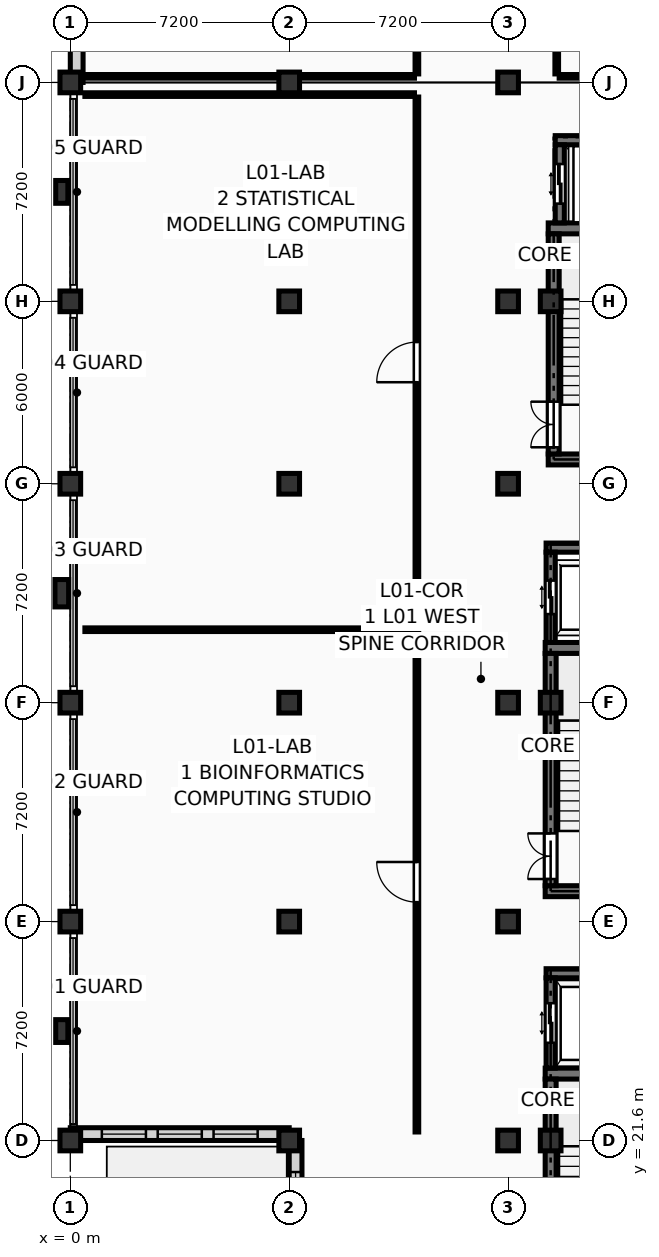
"""IFC4 building model, lengths in metres.
Left out: names, types, materials, properties, quantities, classifications, styles, units other than length and angle.
Written with IfcOpenShell. Run it as: python <this file> out.ifc"""

import sys

from ifc_helpers import new_model, si_unit, direction, frame, frame_2d, origin, origin_2d, place, context, subcontext, project, spatial, rectangle, extrude, element, fill, save


model = new_model("IFC4")
c1 = context("Model", 3, precision=1e-05, world=origin(), true_north=direction((0.0, 1.0)))
c2 = subcontext(c1, "Body", "Model", "MODEL_VIEW")
j1 = project(units=[si_unit("LENGTHUNIT", "METRE"), si_unit("PLANEANGLEUNIT", "RADIAN")], contexts=[c1])
p1 = place(None, origin())
s1 = spatial("IfcSite", under=j1, at=p1, CompositionType="ELEMENT")
p2 = place(p1, origin())
s2 = spatial("IfcBuilding", under=s1, at=p2, CompositionType="ELEMENT")
p3 = place(p2, frame((0.0, 0.0, 4.5)))
s3 = spatial("IfcBuildingStorey", under=s2, at=p3, CompositionType="ELEMENT", Elevation=4.5)
for number, where, z_axis, x_axis in (
    (1, (0.0, 21.6, 0.0), (0.0, 0.0, 1.0), (1.0, 0.0, 0.0)),
    (2, (0.0, 28.8, 0.0), (0.0, 0.0, 1.0), (1.0, 0.0, 0.0)),
    (3, (0.0, 36.0, 0.0), (0.0, 0.0, 1.0), (1.0, 0.0, 0.0)),
    (4, (0.0, 43.2, 0.0), (0.0, 0.0, 1.0), (1.0, 0.0, 0.0)),
    (5, (0.0, 49.2, 0.0), (0.0, 0.0, 1.0), (1.0, 0.0, 0.0)),
    (6, (0.0, 56.4, 0.0), (0.0, 0.0, 1.0), (1.0, 0.0, 0.0)),
    (7, (7.2, 21.6, 0.0), (0.0, 0.0, 1.0), (1.0, 0.0, 0.0)),
    (8, (7.2, 28.8, 0.0), (0.0, 0.0, 1.0), (1.0, 0.0, 0.0)),
    (9, (7.2, 36.0, 0.0), (0.0, 0.0, 1.0), (1.0, 0.0, 0.0)),
    (10, (7.2, 43.2, 0.0), (0.0, 0.0, 1.0), (1.0, 0.0, 0.0)),
    (11, (7.2, 49.2, 0.0), (0.0, 0.0, 1.0), (1.0, 0.0, 0.0)),
    (12, (7.2, 56.4, 0.0), (0.0, 0.0, 1.0), (1.0, 0.0, 0.0)),
    (13, (14.4, 21.6, 0.0), (0.0, 0.0, 1.0), (1.0, 0.0, 0.0)),
    (14, (14.4, 28.8, 0.0), (0.0, 0.0, 1.0), (1.0, 0.0, 0.0)),
    (15, (14.4, 36.0, 0.0), (0.0, 0.0, 1.0), (1.0, 0.0, 0.0)),
    (16, (14.4, 43.2, 0.0), (0.0, 0.0, 1.0), (1.0, 0.0, 0.0)),
    (17, (14.4, 49.2, 0.0), (0.0, 0.0, 1.0), (1.0, 0.0, 0.0)),
    (18, (14.4, 56.4, 0.0), (0.0, 0.0, 1.0), (1.0, 0.0, 0.0)),
    (19, (15.8, 21.6, 0.0), (0.0, 0.0, 1.0), (1.0, 0.0, 0.0)),
    (20, (15.8, 36.0, 0.0), (0.0, 0.0, 1.0), (1.0, 0.0, 0.0)),
    (21, (15.8, 49.2, 0.0), (0.0, 0.0, 1.0), (1.0, 0.0, 0.0)),
):
    element("IfcColumn", number, at=place(p3, frame(where, z_axis=z_axis, x_axis=x_axis)), inside=s3, PredefinedType="COLUMN", context=c2, shape_type="SweptSolid", body=[
        extrude(rectangle(XDim=0.68, YDim=0.68, at=origin_2d()), origin(), (0.0, 0.0, 1.0), 4.05),
    ])
p4 = place(p3, frame((-0.28, 25.2, 0.0), z_axis=(0.0, 0.0, 1.0), x_axis=(1.0, 0.0, 0.0)))
e22 = element("IfcColumn", 22, at=p4, inside=s3, PredefinedType="PILASTER", context=c2, shape_type="SweptSolid", body=[
    extrude(rectangle(XDim=0.4, YDim=0.75, at=origin_2d()), origin(), (0.0, 0.0, 1.0), 4.05),
])
p5 = place(p3, frame((-0.28, 39.6, 0.0), z_axis=(0.0, 0.0, 1.0), x_axis=(1.0, 0.0, 0.0)))
e23 = element("IfcColumn", 23, at=p5, inside=s3, PredefinedType="PILASTER", context=c2, shape_type="SweptSolid", body=[
    extrude(rectangle(XDim=0.45, YDim=0.9, at=origin_2d()), origin(), (0.0, 0.0, 1.0), 4.05),
])
p6 = place(p3, frame((-0.28, 52.8, 0.0), z_axis=(0.0, 0.0, 1.0), x_axis=(1.0, 0.0, 0.0)))
e24 = element("IfcColumn", 24, at=p6, inside=s3, PredefinedType="PILASTER", context=c2, shape_type="SweptSolid", body=[
    extrude(rectangle(XDim=0.4, YDim=0.75, at=origin_2d()), origin(), (0.0, 0.0, 1.0), 4.05),
])
p7 = place(p3, frame((7.41, 14.4, 0.0), z_axis=(0.0, 0.0, 1.0), x_axis=(0.0, 1.0, 0.0)))
e25 = element("IfcWall", 25, at=p7, inside=s3, PredefinedType="SOLIDWALL", context=c2, shape_type="SweptSolid", body=[
    extrude(rectangle(XDim=7.2, YDim=0.42, at=frame_2d((3.6, 0.0))), origin(), (0.0, 0.0, 1.0), 3.16),
])
p8 = place(p7, frame((1.038, 0.0, 0.18)))
e26 = element("IfcOpeningElement", 26, at=p8, cuts=e25, PredefinedType="OPENING", context=c2, shape_type="SweptSolid", body=[
    extrude(rectangle(XDim=1.45, YDim=2.8, at=frame_2d((0.725, 1.4))), frame((0.0, 0.222, 0.0), z_axis=(0.0, -1.0, 0.0), x_axis=(1.0, 0.0, 0.0)), (0.0, 0.0, 1.0), 0.444),
])
p9 = place(p7, frame((2.875, 0.0, 0.18)))
e27 = element("IfcOpeningElement", 27, at=p9, cuts=e25, PredefinedType="OPENING", context=c2, shape_type="SweptSolid", body=[
    extrude(rectangle(XDim=1.45, YDim=2.8, at=frame_2d((0.725, 1.4))), frame((0.0, 0.222, 0.0), z_axis=(0.0, -1.0, 0.0), x_axis=(1.0, 0.0, 0.0)), (0.0, 0.0, 1.0), 0.444),
])
p10 = place(p7, frame((4.712, 0.0, 0.18)))
e28 = element("IfcOpeningElement", 28, at=p10, cuts=e25, PredefinedType="OPENING", context=c2, shape_type="SweptSolid", body=[
    extrude(rectangle(XDim=1.45, YDim=2.8, at=frame_2d((0.725, 1.4))), frame((0.0, 0.222, 0.0), z_axis=(0.0, -1.0, 0.0), x_axis=(1.0, 0.0, 0.0)), (0.0, 0.0, 1.0), 0.444),
])
p11 = place(p3, frame((0.0, 21.81, 0.0), z_axis=(0.0, 0.0, 1.0), x_axis=(1.0, 0.0, 0.0)))
e29 = element("IfcWall", 29, at=p11, inside=s3, PredefinedType="SOLIDWALL", context=c2, shape_type="SweptSolid", body=[
    extrude(rectangle(XDim=7.2, YDim=0.42, at=frame_2d((3.6, 0.0))), origin(), (0.0, 0.0, 1.0), 3.16),
])
p12 = place(p11, frame((1.038, 0.0, 0.18)))
e30 = element("IfcOpeningElement", 30, at=p12, cuts=e29, PredefinedType="OPENING", context=c2, shape_type="SweptSolid", body=[
    extrude(rectangle(XDim=1.45, YDim=2.8, at=frame_2d((0.725, 1.4))), frame((0.0, 0.222, 0.0), z_axis=(0.0, -1.0, 0.0), x_axis=(1.0, 0.0, 0.0)), (0.0, 0.0, 1.0), 0.444),
])
p13 = place(p11, frame((2.875, 0.0, 0.18)))
e31 = element("IfcOpeningElement", 31, at=p13, cuts=e29, PredefinedType="OPENING", context=c2, shape_type="SweptSolid", body=[
    extrude(rectangle(XDim=1.45, YDim=2.8, at=frame_2d((0.725, 1.4))), frame((0.0, 0.222, 0.0), z_axis=(0.0, -1.0, 0.0), x_axis=(1.0, 0.0, 0.0)), (0.0, 0.0, 1.0), 0.444),
])
p14 = place(p11, frame((4.712, 0.0, 0.18)))
e32 = element("IfcOpeningElement", 32, at=p14, cuts=e29, PredefinedType="OPENING", context=c2, shape_type="SweptSolid", body=[
    extrude(rectangle(XDim=1.45, YDim=2.8, at=frame_2d((0.725, 1.4))), frame((0.0, 0.222, 0.0), z_axis=(0.0, -1.0, 0.0), x_axis=(1.0, 0.0, 0.0)), (0.0, 0.0, 1.0), 0.444),
])
p15 = place(p3, frame((0.21, 56.4, 0.0), z_axis=(0.0, 0.0, 1.0), x_axis=(0.0, 1.0, 0.0)))
e33 = element("IfcWall", 33, at=p15, inside=s3, PredefinedType="SOLIDWALL", context=c2, shape_type="SweptSolid", body=[
    extrude(rectangle(XDim=7.2, YDim=0.42, at=frame_2d((3.6, 0.0))), origin(), (0.0, 0.0, 1.0), 3.16),
])
p16 = place(p15, frame((1.783, 0.0, 0.45)))
e34 = element("IfcOpeningElement", 34, at=p16, cuts=e33, PredefinedType="OPENING", context=c2, shape_type="SweptSolid", body=[
    extrude(rectangle(XDim=1.3, YDim=2.35, at=frame_2d((0.65, 1.175))), frame((0.0, 0.222, 0.0), z_axis=(0.0, -1.0, 0.0), x_axis=(1.0, 0.0, 0.0)), (0.0, 0.0, 1.0), 0.444),
])
p17 = place(p15, frame((4.117, 0.0, 0.45)))
e35 = element("IfcOpeningElement", 35, at=p17, cuts=e33, PredefinedType="OPENING", context=c2, shape_type="SweptSolid", body=[
    extrude(rectangle(XDim=1.3, YDim=2.35, at=frame_2d((0.65, 1.175))), frame((0.0, 0.222, 0.0), z_axis=(0.0, -1.0, 0.0), x_axis=(1.0, 0.0, 0.0)), (0.0, 0.0, 1.0), 0.444),
])
p18 = place(p3, frame((15.62, 23.8, 0.0), z_axis=(0.0, 0.0, 1.0), x_axis=(1.0, 0.0, 0.0)))
e36 = element("IfcWall", 36, at=p18, inside=s3, PredefinedType="SHEAR", context=c2, shape_type="SweptSolid", body=[
    extrude(rectangle(XDim=4.88, YDim=0.36, at=frame_2d((2.44, 0.0))), origin(), (0.0, 0.0, 1.0), 3.79),
])
p19 = place(p3, frame((15.8, 15.98, 0.0), z_axis=(0.0, 0.0, 1.0), x_axis=(0.0, 1.0, 0.0)))
e37 = element("IfcWall", 37, at=p19, inside=s3, PredefinedType="SHEAR", context=c2, shape_type="SweptSolid", body=[
    extrude(rectangle(XDim=7.64, YDim=0.36, at=frame_2d((3.82, 0.0))), origin(), (0.0, 0.0, 1.0), 3.79),
])
p20 = place(p19, frame((0.22, 0.0, 0.0)))
e38 = element("IfcOpeningElement", 38, at=p20, cuts=e37, PredefinedType="OPENING", context=c2, shape_type="SweptSolid", body=[
    extrude(rectangle(XDim=1.5, YDim=2.2, at=frame_2d((0.75, 1.1))), frame((0.0, 0.192, 0.0), z_axis=(0.0, -1.0, 0.0), x_axis=(1.0, 0.0, 0.0)), (0.0, 0.0, 1.0), 0.384),
])
for number, where, z_axis, x_axis in (
    (39, (15.62, 29.8, 0.0), (0.0, 0.0, 1.0), (1.0, 0.0, 0.0)),
    (40, (15.62, 37.8, 0.0), (0.0, 0.0, 1.0), (1.0, 0.0, 0.0)),
):
    element("IfcWall", number, at=place(p3, frame(where, z_axis=z_axis, x_axis=x_axis)), inside=s3, PredefinedType="SHEAR", context=c2, shape_type="SweptSolid", body=[
        extrude(rectangle(XDim=4.88, YDim=0.36, at=frame_2d((2.44, 0.0))), origin(), (0.0, 0.0, 1.0), 3.79),
    ])
p21 = place(p3, frame((15.8, 29.98, 0.0), z_axis=(0.0, 0.0, 1.0), x_axis=(0.0, 1.0, 0.0)))
e41 = element("IfcWall", 41, at=p21, inside=s3, PredefinedType="SHEAR", context=c2, shape_type="SweptSolid", body=[
    extrude(rectangle(XDim=7.64, YDim=0.36, at=frame_2d((3.82, 0.0))), origin(), (0.0, 0.0, 1.0), 3.79),
])
p22 = place(p21, frame((0.22, 0.0, 0.0)))
e42 = element("IfcOpeningElement", 42, at=p22, cuts=e41, PredefinedType="OPENING", context=c2, shape_type="SweptSolid", body=[
    extrude(rectangle(XDim=1.5, YDim=2.2, at=frame_2d((0.75, 1.1))), frame((0.0, 0.192, 0.0), z_axis=(0.0, -1.0, 0.0), x_axis=(1.0, 0.0, 0.0)), (0.0, 0.0, 1.0), 0.384),
])
for number, where, z_axis, x_axis in (
    (43, (15.72, 44.0, 0.0), (0.0, 0.0, 1.0), (1.0, 0.0, 0.0)),
    (44, (15.72, 51.6, 0.0), (0.0, 0.0, 1.0), (1.0, 0.0, 0.0)),
):
    element("IfcWall", number, at=place(p3, frame(where, z_axis=z_axis, x_axis=x_axis)), inside=s3, PredefinedType="SHEAR", context=c2, shape_type="SweptSolid", body=[
        extrude(rectangle(XDim=4.48, YDim=0.36, at=frame_2d((2.24, 0.0))), origin(), (0.0, 0.0, 1.0), 3.79),
    ])
p23 = place(p3, frame((15.9, 44.18, 0.0), z_axis=(0.0, 0.0, 1.0), x_axis=(0.0, 1.0, 0.0)))
e45 = element("IfcWall", 45, at=p23, inside=s3, PredefinedType="SHEAR", context=c2, shape_type="SweptSolid", body=[
    extrude(rectangle(XDim=7.24, YDim=0.36, at=frame_2d((3.62, 0.0))), origin(), (0.0, 0.0, 1.0), 3.79),
])
p24 = place(p23, frame((0.22, 0.0, 0.0)))
e46 = element("IfcOpeningElement", 46, at=p24, cuts=e45, PredefinedType="OPENING", context=c2, shape_type="SweptSolid", body=[
    extrude(rectangle(XDim=1.5, YDim=2.2, at=frame_2d((0.75, 1.1))), frame((0.0, 0.192, 0.0), z_axis=(0.0, -1.0, 0.0), x_axis=(1.0, 0.0, 0.0)), (0.0, 0.0, 1.0), 0.384),
])
p25 = place(p3, frame((15.65, 27.1, 0.0), z_axis=(0.0, 0.0, 1.0), x_axis=(1.0, 0.0, 0.0)))
e47 = element("IfcWall", 47, at=p25, inside=s3, PredefinedType="SHEAR", context=c2, shape_type="SweptSolid", body=[
    extrude(rectangle(XDim=2.56, YDim=0.3, at=frame_2d((1.28, 0.0))), origin(), (0.0, 0.0, 1.0), 3.79),
])
p26 = place(p3, frame((15.8, 23.98, 0.0), z_axis=(0.0, 0.0, 1.0), x_axis=(0.0, 1.0, 0.0)))
e48 = element("IfcWall", 48, at=p26, inside=s3, PredefinedType="SHEAR", context=c2, shape_type="SweptSolid", body=[
    extrude(rectangle(XDim=2.97, YDim=0.3, at=frame_2d((1.485, 0.0))), origin(), (0.0, 0.0, 1.0), 3.79),
])
p27 = place(p26, frame((0.835, 0.0, 0.0)))
e49 = element("IfcOpeningElement", 49, at=p27, cuts=e48, PredefinedType="OPENING", context=c2, shape_type="SweptSolid", body=[
    extrude(rectangle(XDim=1.3, YDim=2.25, at=frame_2d((0.65, 1.125))), frame((0.0, 0.162, 0.0), z_axis=(0.0, -1.0, 0.0), x_axis=(1.0, 0.0, 0.0)), (0.0, 0.0, 1.0), 0.324),
])
p28 = place(p3, frame((15.65, 41.1, 0.0), z_axis=(0.0, 0.0, 1.0), x_axis=(1.0, 0.0, 0.0)))
e50 = element("IfcWall", 50, at=p28, inside=s3, PredefinedType="SHEAR", context=c2, shape_type="SweptSolid", body=[
    extrude(rectangle(XDim=2.56, YDim=0.3, at=frame_2d((1.28, 0.0))), origin(), (0.0, 0.0, 1.0), 3.79),
])
p29 = place(p3, frame((15.8, 37.98, 0.0), z_axis=(0.0, 0.0, 1.0), x_axis=(0.0, 1.0, 0.0)))
e51 = element("IfcWall", 51, at=p29, inside=s3, PredefinedType="SHEAR", context=c2, shape_type="SweptSolid", body=[
    extrude(rectangle(XDim=2.97, YDim=0.3, at=frame_2d((1.485, 0.0))), origin(), (0.0, 0.0, 1.0), 3.79),
])
p30 = place(p29, frame((0.935, 0.0, 0.0)))
e52 = element("IfcOpeningElement", 52, at=p30, cuts=e51, PredefinedType="OPENING", context=c2, shape_type="SweptSolid", body=[
    extrude(rectangle(XDim=1.1, YDim=2.2, at=frame_2d((0.55, 1.1))), frame((0.0, 0.162, 0.0), z_axis=(0.0, -1.0, 0.0), x_axis=(1.0, 0.0, 0.0)), (0.0, 0.0, 1.0), 0.324),
])
p31 = place(p3, frame((15.95, 54.5, 0.0), z_axis=(0.0, 0.0, 1.0), x_axis=(1.0, 0.0, 0.0)))
e53 = element("IfcWall", 53, at=p31, inside=s3, PredefinedType="SHEAR", context=c2, shape_type="SweptSolid", body=[
    extrude(rectangle(XDim=3.0, YDim=0.3, at=frame_2d((1.5, 0.0))), origin(), (0.0, 0.0, 1.0), 3.79),
])
p32 = place(p3, frame((16.1, 51.78, 0.0), z_axis=(0.0, 0.0, 1.0), x_axis=(0.0, 1.0, 0.0)))
e54 = element("IfcWall", 54, at=p32, inside=s3, PredefinedType="SHEAR", context=c2, shape_type="SweptSolid", body=[
    extrude(rectangle(XDim=2.57, YDim=0.3, at=frame_2d((1.285, 0.0))), origin(), (0.0, 0.0, 1.0), 3.79),
])
p33 = place(p32, frame((0.635, 0.0, 0.0)))
e55 = element("IfcOpeningElement", 55, at=p33, cuts=e54, PredefinedType="OPENING", context=c2, shape_type="SweptSolid", body=[
    extrude(rectangle(XDim=1.3, YDim=2.25, at=frame_2d((0.65, 1.125))), frame((0.0, 0.162, 0.0), z_axis=(0.0, -1.0, 0.0), x_axis=(1.0, 0.0, 0.0)), (0.0, 0.0, 1.0), 0.324),
])
p34 = place(p3, frame((11.4, 21.88, 0.0), z_axis=(0.0, 0.0, 1.0), x_axis=(0.0, 1.0, 0.0)))
e56 = element("IfcWall", 56, at=p34, inside=s3, PredefinedType="PARTITIONING", context=c2, shape_type="SweptSolid", body=[
    extrude(rectangle(XDim=16.44, YDim=0.12, at=frame_2d((8.22, 0.0))), origin(), (0.0, 0.0, 1.0), 3.775),
])
p35 = place(p34, frame((7.56, 0.0, 0.0)))
e57 = element("IfcOpeningElement", 57, at=p35, cuts=e56, PredefinedType="OPENING", context=c2, shape_type="SweptSolid", body=[
    extrude(rectangle(XDim=1.32, YDim=2.2, at=frame_2d((0.66, 1.1))), frame((0.0, 0.072, 0.0), z_axis=(0.0, -1.0, 0.0), x_axis=(1.0, 0.0, 0.0)), (0.0, 0.0, 1.0), 0.144),
])
p36 = place(p3, frame((0.48, 38.4, 0.0), z_axis=(0.0, 0.0, 1.0), x_axis=(1.0, 0.0, 0.0)))
e58 = element("IfcWall", 58, at=p36, inside=s3, PredefinedType="PARTITIONING", context=c2, shape_type="SweptSolid", body=[
    extrude(rectangle(XDim=10.84, YDim=0.12, at=frame_2d((5.42, 0.0))), origin(), (0.0, 0.0, 1.0), 3.775),
])
p37 = place(p3, frame((11.4, 38.48, 0.0), z_axis=(0.0, 0.0, 1.0), x_axis=(0.0, 1.0, 0.0)))
e59 = element("IfcWall", 59, at=p37, inside=s3, PredefinedType="PARTITIONING", context=c2, shape_type="SweptSolid", body=[
    extrude(rectangle(XDim=17.44, YDim=0.12, at=frame_2d((8.72, 0.0))), origin(), (0.0, 0.0, 1.0), 3.775),
])
p38 = place(p37, frame((8.06, 0.0, 0.0)))
e60 = element("IfcOpeningElement", 60, at=p38, cuts=e59, PredefinedType="OPENING", context=c2, shape_type="SweptSolid", body=[
    extrude(rectangle(XDim=1.32, YDim=2.2, at=frame_2d((0.66, 1.1))), frame((0.0, 0.072, 0.0), z_axis=(0.0, -1.0, 0.0), x_axis=(1.0, 0.0, 0.0)), (0.0, 0.0, 1.0), 0.144),
])
for number, where, z_axis, x_axis in (
    (61, (0.48, 56.0, 0.0), (0.0, 0.0, 1.0), (1.0, 0.0, 0.0)),
    (62, (0.48, 56.6, 0.0), (0.0, 0.0, 1.0), (1.0, 0.0, 0.0)),
):
    element("IfcWall", number, at=place(p3, frame(where, z_axis=z_axis, x_axis=x_axis)), inside=s3, PredefinedType="PARTITIONING", context=c2, shape_type="SweptSolid", body=[
        extrude(rectangle(XDim=10.84, YDim=0.12, at=frame_2d((5.42, 0.0))), origin(), (0.0, 0.0, 1.0), 3.025),
    ])
p39 = place(p3, frame((11.4, 56.68, 0.0), z_axis=(0.0, 0.0, 1.0), x_axis=(0.0, 1.0, 0.0)))
e63 = element("IfcWall", 63, at=p39, inside=s3, PredefinedType="PARTITIONING", context=c2, shape_type="SweptSolid", body=[
    extrude(rectangle(XDim=28.44, YDim=0.12, at=frame_2d((14.22, 0.0))), origin(), (0.0, 0.0, 1.0), 3.775),
])
p40 = place(p39, frame((13.37, 0.0, 0.0)))
e64 = element("IfcOpeningElement", 64, at=p40, cuts=e63, PredefinedType="OPENING", context=c2, shape_type="SweptSolid", body=[
    extrude(rectangle(XDim=1.7, YDim=2.28, at=frame_2d((0.85, 1.14))), frame((0.0, 0.072, 0.0), z_axis=(0.0, -1.0, 0.0), x_axis=(1.0, 0.0, 0.0)), (0.0, 0.0, 1.0), 0.144),
])
p41 = place(p3, frame((16.0, 56.68, 0.0), z_axis=(0.0, 0.0, 1.0), x_axis=(0.0, 1.0, 0.0)))
e65 = element("IfcWall", 65, at=p41, inside=s3, PredefinedType="PARTITIONING", context=c2, shape_type="SweptSolid", body=[
    extrude(rectangle(XDim=15.1, YDim=0.12, at=frame_2d((7.55, 0.0))), origin(), (0.0, 0.0, 1.0), 3.775),
])
p42 = place(p41, frame((8.558, 0.0, 0.0)))
e66 = element("IfcOpeningElement", 66, at=p42, cuts=e65, PredefinedType="OPENING", context=c2, shape_type="SweptSolid", body=[
    extrude(rectangle(XDim=1.32, YDim=2.2, at=frame_2d((0.66, 1.1))), frame((0.0, 0.072, 0.0), z_axis=(0.0, -1.0, 0.0), x_axis=(1.0, 0.0, 0.0)), (0.0, 0.0, 1.0), 0.144),
])
p43 = place(p3, frame((16.08, 56.6, 0.0), z_axis=(0.0, 0.0, 1.0), x_axis=(1.0, 0.0, 0.0)))
e67 = element("IfcWall", 67, at=p43, inside=s3, PredefinedType="PARTITIONING", context=c2, shape_type="SweptSolid", body=[
    extrude(rectangle(XDim=12.24, YDim=0.12, at=frame_2d((6.12, 0.0))), origin(), (0.0, 0.0, 1.0), 3.025),
])
p44 = place(p10, origin())
e68 = element("IfcWindow", 68, at=p44, inside=s3, PartitioningType="SINGLE_PANEL", PredefinedType="WINDOW", context=c2, shape_type="SweptSolid", body=[
    extrude(rectangle(XDim=1.45, YDim=2.8, at=frame_2d((0.725, 1.4))), frame((0.0, 0.03, 0.0), z_axis=(0.0, -1.0, 0.0), x_axis=(1.0, 0.0, 0.0)), (0.0, 0.0, 1.0), 0.06),
])
fill(e28, e68)
p45 = place(p12, origin())
e69 = element("IfcWindow", 69, at=p45, inside=s3, PartitioningType="SINGLE_PANEL", PredefinedType="WINDOW", context=c2, shape_type="SweptSolid", body=[
    extrude(rectangle(XDim=1.45, YDim=2.8, at=frame_2d((0.725, 1.4))), frame((0.0, 0.03, 0.0), z_axis=(0.0, -1.0, 0.0), x_axis=(1.0, 0.0, 0.0)), (0.0, 0.0, 1.0), 0.06),
])
fill(e30, e69)
p46 = place(p13, origin())
e70 = element("IfcWindow", 70, at=p46, inside=s3, PartitioningType="SINGLE_PANEL", PredefinedType="WINDOW", context=c2, shape_type="SweptSolid", body=[
    extrude(rectangle(XDim=1.45, YDim=2.8, at=frame_2d((0.725, 1.4))), frame((0.0, 0.03, 0.0), z_axis=(0.0, -1.0, 0.0), x_axis=(1.0, 0.0, 0.0)), (0.0, 0.0, 1.0), 0.06),
])
fill(e31, e70)
p47 = place(p14, origin())
e71 = element("IfcWindow", 71, at=p47, inside=s3, PartitioningType="SINGLE_PANEL", PredefinedType="WINDOW", context=c2, shape_type="SweptSolid", body=[
    extrude(rectangle(XDim=1.45, YDim=2.8, at=frame_2d((0.725, 1.4))), frame((0.0, 0.03, 0.0), z_axis=(0.0, -1.0, 0.0), x_axis=(1.0, 0.0, 0.0)), (0.0, 0.0, 1.0), 0.06),
])
fill(e32, e71)
p48 = place(p22, origin())
e72 = element("IfcDoor", 72, at=p48, inside=s3, OperationType="DOUBLE_DOOR_SINGLE_SWING", PredefinedType="DOOR", context=c2, shape_type="SweptSolid", body=[
    extrude(rectangle(XDim=1.5, YDim=2.2, at=frame_2d((0.75, 1.1))), frame((0.0, 0.025, 0.0), z_axis=(0.0, -1.0, 0.0), x_axis=(1.0, 0.0, 0.0)), (0.0, 0.0, 1.0), 0.05),
])
fill(e42, e72)
p49 = place(p24, origin())
e73 = element("IfcDoor", 73, at=p49, inside=s3, OperationType="DOUBLE_DOOR_SINGLE_SWING", PredefinedType="DOOR", context=c2, shape_type="SweptSolid", body=[
    extrude(rectangle(XDim=1.5, YDim=2.2, at=frame_2d((0.75, 1.1))), frame((0.0, 0.025, 0.0), z_axis=(0.0, -1.0, 0.0), x_axis=(1.0, 0.0, 0.0)), (0.0, 0.0, 1.0), 0.05),
])
fill(e46, e73)
p50 = place(p27, origin())
e74 = element("IfcDoor", 74, at=p50, inside=s3, OperationType="DOUBLE_DOOR_SLIDING", PredefinedType="DOOR", context=c2, shape_type="SweptSolid", body=[
    extrude(rectangle(XDim=1.3, YDim=2.25, at=frame_2d((0.65, 1.125))), frame((0.0, 0.025, 0.0), z_axis=(0.0, -1.0, 0.0), x_axis=(1.0, 0.0, 0.0)), (0.0, 0.0, 1.0), 0.05),
])
fill(e49, e74)
p51 = place(p30, origin())
e75 = element("IfcDoor", 75, at=p51, inside=s3, OperationType="DOUBLE_DOOR_SLIDING", PredefinedType="DOOR", context=c2, shape_type="SweptSolid", body=[
    extrude(rectangle(XDim=1.1, YDim=2.2, at=frame_2d((0.55, 1.1))), frame((0.0, 0.025, 0.0), z_axis=(0.0, -1.0, 0.0), x_axis=(1.0, 0.0, 0.0)), (0.0, 0.0, 1.0), 0.05),
])
fill(e52, e75)
p52 = place(p33, origin())
e76 = element("IfcDoor", 76, at=p52, inside=s3, OperationType="DOUBLE_DOOR_SLIDING", PredefinedType="DOOR", context=c2, shape_type="SweptSolid", body=[
    extrude(rectangle(XDim=1.3, YDim=2.25, at=frame_2d((0.65, 1.125))), frame((0.0, 0.025, 0.0), z_axis=(0.0, -1.0, 0.0), x_axis=(1.0, 0.0, 0.0)), (0.0, 0.0, 1.0), 0.05),
])
fill(e55, e76)
p53 = place(p35, origin())
e77 = element("IfcDoor", 77, at=p53, inside=s3, OperationType="SINGLE_SWING_RIGHT", PredefinedType="DOOR", context=c2, shape_type="SweptSolid", body=[
    extrude(rectangle(XDim=1.32, YDim=2.2, at=frame_2d((0.66, 1.1))), frame((0.0, 0.025, 0.0), z_axis=(0.0, -1.0, 0.0), x_axis=(1.0, 0.0, 0.0)), (0.0, 0.0, 1.0), 0.05),
])
fill(e57, e77)
p54 = place(p38, origin())
e78 = element("IfcDoor", 78, at=p54, inside=s3, OperationType="SINGLE_SWING_LEFT", PredefinedType="DOOR", context=c2, shape_type="SweptSolid", body=[
    extrude(rectangle(XDim=1.32, YDim=2.2, at=frame_2d((0.66, 1.1))), frame((0.0, 0.025, 0.0), z_axis=(0.0, -1.0, 0.0), x_axis=(1.0, 0.0, 0.0)), (0.0, 0.0, 1.0), 0.05),
])
fill(e60, e78)
save(model, sys.argv[1])
